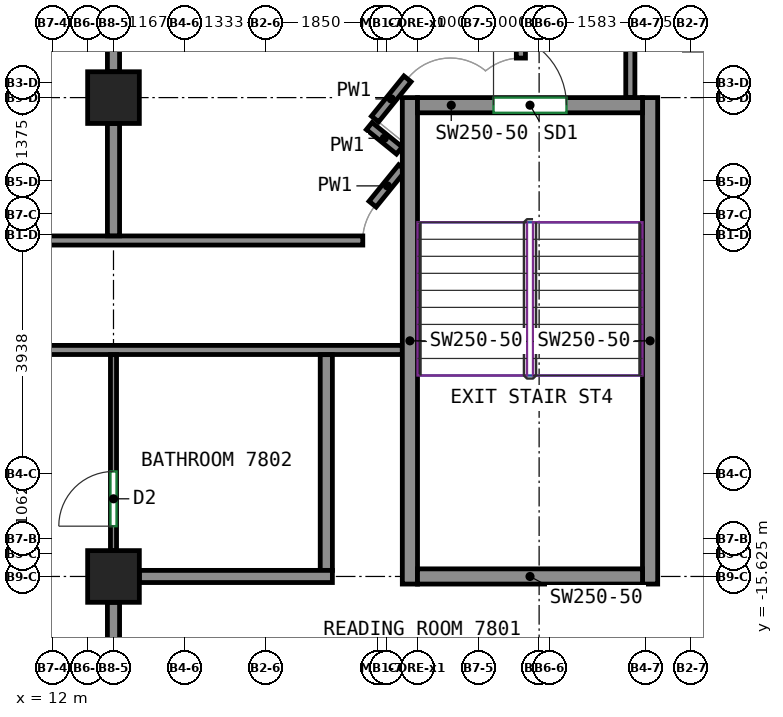
"""IFC4 building model, lengths in metres.
Left out: names, types, materials, properties, quantities, classifications, styles, units other than length and angle.
Written with IfcOpenShell. Run it as: python <this file> out.ifc"""

import sys

from ifc_helpers import new_model, si_unit, direction, frame, frame_2d, origin, origin_2d, place, context, subcontext, project, spatial, rectangle, extrude, source, transform, mapped, element, fill, save


model = new_model("IFC4")
c1 = context("Model", 3, precision=1e-05, world=origin(), true_north=direction((0.0, 1.0)))
c2 = subcontext(c1, "Body", "Model", "MODEL_VIEW")
j1 = project(units=[si_unit("LENGTHUNIT", "METRE"), si_unit("PLANEANGLEUNIT", "RADIAN")], contexts=[c1])
p1 = place(None, origin())
s1 = spatial("IfcSite", under=j1, at=p1, CompositionType="ELEMENT")
p2 = place(p1, origin())
s2 = spatial("IfcBuilding", under=s1, at=p2, CompositionType="ELEMENT")
p3 = place(p2, frame((0.0, 0.0, 312.0)))
s3 = spatial("IfcBuildingStorey", under=s2, at=p3, CompositionType="ELEMENT", Elevation=312.0)
m1 = source(origin(), c2, "Body", "SweptSolid", [
    extrude(rectangle(XDim=0.85, YDim=0.85, at=origin_2d()), origin(), (0.0, 0.0, 1.0), 3.12),
])
for number, where, z_axis, x_axis in (
    (1, (13.0, -15.625, 0.0), (0.0, 0.0, 1.0), (1.0, 0.0, 0.0)),
    (2, (13.0, -7.75, 0.0), (0.0, 0.0, 1.0), (1.0, 0.0, 0.0)),
):
    element("IfcColumn", number, at=place(p3, frame(where, z_axis=z_axis, x_axis=x_axis)), inside=s3, PredefinedType="COLUMN", context=c2, shape_type="MappedRepresentation", body=[
        mapped(m1, transform((0.0, 0.0, 0.0))),
    ])
m2 = source(origin(), c2, "Body", "SweptSolid", [
    extrude(rectangle(XDim=8.0, YDim=0.25, at=frame_2d((4.0, 0.0))), origin(), (0.0, 0.0, 1.0), 3.12),
])
for number, where, z_axis, x_axis in (
    (3, (17.875, -15.75, 0.0), (0.0, 0.0, 1.0), (0.0, 1.0, 0.0)),
    (4, (21.825, -15.75, 0.0), (0.0, 0.0, 1.0), (0.0, 1.0, 0.0)),
):
    element("IfcWall", number, at=place(p3, frame(where, z_axis=z_axis, x_axis=x_axis)), inside=s3, PredefinedType="SHEAR", context=c2, shape_type="MappedRepresentation", body=[
        mapped(m2, transform((0.0, 0.0, 0.0))),
    ])
m3 = source(origin(), c2, "Body", "SweptSolid", [
    extrude(rectangle(XDim=3.7, YDim=0.25, at=frame_2d((1.85, 0.0))), origin(), (0.0, 0.0, 1.0), 3.12),
])
p4 = place(p3, frame((18.0, -15.625, 0.0), z_axis=(0.0, 0.0, 1.0), x_axis=(1.0, 0.0, 0.0)))
e5 = element("IfcWall", 5, at=p4, inside=s3, PredefinedType="SHEAR", context=c2, shape_type="MappedRepresentation", body=[
    mapped(m3, transform((0.0, 0.0, 0.0))),
])
p5 = place(p3, frame((18.0, -7.875, 0.0), z_axis=(0.0, 0.0, 1.0), x_axis=(1.0, 0.0, 0.0)))
e6 = element("IfcWall", 6, at=p5, inside=s3, PredefinedType="SHEAR", context=c2, shape_type="MappedRepresentation", body=[
    mapped(m3, transform((0.0, 0.0, 0.0))),
])
p6 = place(p5, frame((1.25, 0.0, 0.0)))
e7 = element("IfcOpeningElement", 7, at=p6, cuts=e6, PredefinedType="OPENING", context=c2, shape_type="SweptSolid", body=[
    extrude(rectangle(XDim=1.2, YDim=2.1, at=frame_2d((0.6, 1.05))), frame((0.0, 0.135, 0.0), z_axis=(0.0, -1.0, 0.0), x_axis=(1.0, 0.0, 0.0)), (0.0, 0.0, 1.0), 0.27),
])
p7 = place(p3, frame((-4.51, -11.9, 0.0), z_axis=(0.0, 0.0, 1.0), x_axis=(1.0, 0.0, 0.0)))
e8 = element("IfcWall", 8, at=p7, inside=s3, PredefinedType="PARTITIONING", context=c2, shape_type="SweptSolid", body=[
    extrude(rectangle(XDim=22.26, YDim=0.15, at=frame_2d((11.13, 0.0))), origin(), (0.0, 0.0, 1.0), 3.12),
])
p8 = place(p7, frame((0.403, 0.0, 0.0)))
e9 = element("IfcOpeningElement", 9, at=p8, cuts=e8, PredefinedType="OPENING", context=c2, shape_type="SweptSolid", body=[
    extrude(rectangle(XDim=1.0, YDim=2.1, at=frame_2d((0.5, 1.05))), frame((0.0, 0.085, 0.0), z_axis=(0.0, -1.0, 0.0), x_axis=(1.0, 0.0, 0.0)), (0.0, 0.0, 1.0), 0.17),
])
p9 = place(p3, frame((21.5, -7.75, 0.0), z_axis=(0.0, 0.0, 1.0), x_axis=(0.0, 1.0, 0.0)))
e10 = element("IfcWall", 10, at=p9, inside=s3, PredefinedType="PARTITIONING", context=c2, shape_type="SweptSolid", body=[
    extrude(rectangle(XDim=29.66, YDim=0.15, at=frame_2d((14.83, 0.0))), origin(), (0.0, 0.0, 1.0), 3.12),
])
p10 = place(p9, frame((20.142, 0.0, 0.0)))
e11 = element("IfcOpeningElement", 11, at=p10, cuts=e10, PredefinedType="OPENING", context=c2, shape_type="SweptSolid", body=[
    extrude(rectangle(XDim=0.9, YDim=2.1, at=frame_2d((0.45, 1.05))), frame((0.0, 0.085, 0.0), z_axis=(0.0, -1.0, 0.0), x_axis=(1.0, 0.0, 0.0)), (0.0, 0.0, 1.0), 0.17),
])
p11 = place(p3, frame((-13.55, -10.1, 0.0), z_axis=(0.0, 0.0, 1.0), x_axis=(1.0, 0.0, 0.0)))
e12 = element("IfcWall", 12, at=p11, inside=s3, PredefinedType="PARTITIONING", context=c2, shape_type="SweptSolid", body=[
    extrude(rectangle(XDim=30.65, YDim=0.15, at=frame_2d((15.325, 0.0))), origin(), (0.0, 0.0, 1.0), 3.12),
])
p12 = place(p11, frame((6.956, 0.0, 0.0)))
e13 = element("IfcOpeningElement", 13, at=p12, cuts=e12, PredefinedType="OPENING", context=c2, shape_type="SweptSolid", body=[
    extrude(rectangle(XDim=0.9, YDim=2.1, at=frame_2d((0.45, 1.05))), frame((0.0, 0.085, 0.0), z_axis=(0.0, -1.0, 0.0), x_axis=(1.0, 0.0, 0.0)), (0.0, 0.0, 1.0), 0.17),
])
p13 = place(p11, frame((10.643, 0.0, 0.0)))
e14 = element("IfcOpeningElement", 14, at=p13, cuts=e12, PredefinedType="OPENING", context=c2, shape_type="SweptSolid", body=[
    extrude(rectangle(XDim=0.9, YDim=2.1, at=frame_2d((0.45, 1.05))), frame((0.0, 0.085, 0.0), z_axis=(0.0, -1.0, 0.0), x_axis=(1.0, 0.0, 0.0)), (0.0, 0.0, 1.0), 0.17),
])
p14 = place(p11, frame((24.155, 0.0, 0.0)))
e15 = element("IfcOpeningElement", 15, at=p14, cuts=e12, PredefinedType="OPENING", context=c2, shape_type="SweptSolid", body=[
    extrude(rectangle(XDim=0.9, YDim=2.1, at=frame_2d((0.45, 1.05))), frame((0.0, 0.085, 0.0), z_axis=(0.0, -1.0, 0.0), x_axis=(1.0, 0.0, 0.0)), (0.0, 0.0, 1.0), 0.17),
])
p15 = place(p3, frame((17.748, -8.902, 0.0), z_axis=(0.0, 0.0, 1.0), x_axis=(-0.630342797145, -0.776316918589, 0.0)))
e16 = element("IfcWall", 16, at=p15, inside=s3, PredefinedType="PARTITIONING", context=c2, shape_type="SweptSolid", body=[
    extrude(rectangle(XDim=0.773, YDim=0.15, at=frame_2d((0.386, 0.0))), origin(), (0.0, 0.0, 1.0), 3.12),
])
p16 = place(p3, frame((17.206, -8.218, 0.0), z_axis=(0.0, 0.0, 1.0), x_axis=(0.776102288291, -0.630607039376, 0.0)))
e17 = element("IfcWall", 17, at=p16, inside=s3, PredefinedType="PARTITIONING", context=c2, shape_type="SweptSolid", body=[
    extrude(rectangle(XDim=0.638, YDim=0.15, at=frame_2d((0.319, 0.0))), origin(), (0.0, 0.0, 1.0), 3.12),
])
p17 = place(p3, frame((17.835, -7.442, 0.0), z_axis=(0.0, 0.0, 1.0), x_axis=(-0.628859024249, -0.777519342281, 0.0)))
e18 = element("IfcWall", 18, at=p17, inside=s3, PredefinedType="PARTITIONING", context=c2, shape_type="SweptSolid", body=[
    extrude(rectangle(XDim=0.849, YDim=0.15, at=frame_2d((0.425, 0.0))), origin(), (0.0, 0.0, 1.0), 3.12),
])
p18 = place(p3, frame((19.7, -7.1, 0.0), z_axis=(0.0, 0.0, 1.0), x_axis=(0.0, 1.0, 0.0)))
e19 = element("IfcWall", 19, at=p18, inside=s3, PredefinedType="PARTITIONING", context=c2, shape_type="SweptSolid", body=[
    extrude(rectangle(XDim=7.135, YDim=0.15, at=frame_2d((3.567, 0.0))), origin(), (0.0, 0.0, 1.0), 3.12),
])
p19 = place(p18, frame((5.633, 0.0, 0.0)))
e20 = element("IfcOpeningElement", 20, at=p19, cuts=e19, PredefinedType="OPENING", context=c2, shape_type="SweptSolid", body=[
    extrude(rectangle(XDim=0.9, YDim=2.1, at=frame_2d((0.45, 1.05))), frame((0.0, 0.085, 0.0), z_axis=(0.0, -1.0, 0.0), x_axis=(1.0, 0.0, 0.0)), (0.0, 0.0, 1.0), 0.17),
])
p20 = place(p3, frame((13.0, -15.2, 0.0), z_axis=(0.0, 0.0, 1.0), x_axis=(0.0, 1.0, 0.0)))
e21 = element("IfcWall", 21, at=p20, inside=s3, PredefinedType="PARTITIONING", context=c2, shape_type="SweptSolid", body=[
    extrude(rectangle(XDim=3.223, YDim=0.1, at=frame_2d((1.611, 0.0))), origin(), (0.0, 0.0, 1.0), 3.12),
])
p21 = place(p20, frame((0.402, 0.0, 0.0)))
e22 = element("IfcOpeningElement", 22, at=p21, cuts=e21, PredefinedType="OPENING", context=c2, shape_type="SweptSolid", body=[
    extrude(rectangle(XDim=0.9, YDim=2.1, at=frame_2d((0.45, 1.05))), frame((0.0, 0.06, 0.0), z_axis=(0.0, -1.0, 0.0), x_axis=(1.0, 0.0, 0.0)), (0.0, 0.0, 1.0), 0.12),
])
p22 = place(p3, frame((13.0, -22.75, 0.0), z_axis=(0.0, 0.0, 1.0), x_axis=(0.0, 1.0, 0.0)))
e23 = element("IfcWall", 23, at=p22, inside=s3, PredefinedType="PARTITIONING", context=c2, shape_type="SweptSolid", body=[
    extrude(rectangle(XDim=6.7, YDim=0.2, at=frame_2d((3.35, 0.0))), origin(), (0.0, 0.0, 1.0), 3.12),
])
p23 = place(p3, frame((16.5, -15.525, 0.0), z_axis=(0.0, 0.0, 1.0), x_axis=(0.0, 1.0, 0.0)))
e24 = element("IfcWall", 24, at=p23, inside=s3, PredefinedType="PARTITIONING", context=c2, shape_type="SweptSolid", body=[
    extrude(rectangle(XDim=3.548, YDim=0.2, at=frame_2d((1.774, 0.0))), origin(), (0.0, 0.0, 1.0), 3.12),
])
p24 = place(p3, frame((13.425, -15.625, 0.0), z_axis=(0.0, 0.0, 1.0), x_axis=(1.0, 0.0, 0.0)))
e25 = element("IfcWall", 25, at=p24, inside=s3, PredefinedType="PARTITIONING", context=c2, shape_type="SweptSolid", body=[
    extrude(rectangle(XDim=3.175, YDim=0.2, at=frame_2d((1.587, 0.0))), origin(), (0.0, 0.0, 1.0), 3.12),
])
p25 = place(p3, frame((13.0, -7.325, 0.0), z_axis=(0.0, 0.0, 1.0), x_axis=(0.0, 1.0, 0.0)))
e26 = element("IfcWall", 26, at=p25, inside=s3, PredefinedType="PARTITIONING", context=c2, shape_type="SweptSolid", body=[
    extrude(rectangle(XDim=3.413, YDim=0.2, at=frame_2d((1.707, 0.0))), origin(), (0.0, 0.0, 1.0), 3.12),
])
p26 = place(p3, frame((13.0, -10.023, 0.0), z_axis=(0.0, 0.0, 1.0), x_axis=(0.0, 1.0, 0.0)))
e27 = element("IfcWall", 27, at=p26, inside=s3, PredefinedType="PARTITIONING", context=c2, shape_type="SweptSolid", body=[
    extrude(rectangle(XDim=1.848, YDim=0.2, at=frame_2d((0.924, 0.0))), origin(), (0.0, 0.0, 1.0), 3.12),
])
p27 = place(p6, origin())
e28 = element("IfcDoor", 28, at=p27, inside=s3, OperationType="DOUBLE_DOOR_SINGLE_SWING", PredefinedType="DOOR", context=c2, shape_type="SweptSolid", body=[
    extrude(rectangle(XDim=1.2, YDim=2.1, at=frame_2d((0.6, 1.05))), frame((0.0, 0.025, 0.0), z_axis=(0.0, -1.0, 0.0), x_axis=(1.0, 0.0, 0.0)), (0.0, 0.0, 1.0), 0.05),
])
fill(e7, e28)
p28 = place(p21, origin())
e29 = element("IfcDoor", 29, at=p28, inside=s3, OperationType="SINGLE_SWING_LEFT", PredefinedType="DOOR", context=c2, shape_type="SweptSolid", body=[
    extrude(rectangle(XDim=0.9, YDim=2.1, at=frame_2d((0.45, 1.05))), frame((0.0, 0.025, 0.0), z_axis=(0.0, -1.0, 0.0), x_axis=(1.0, 0.0, 0.0)), (0.0, 0.0, 1.0), 0.05),
])
fill(e22, e29)
save(model, sys.argv[1])
